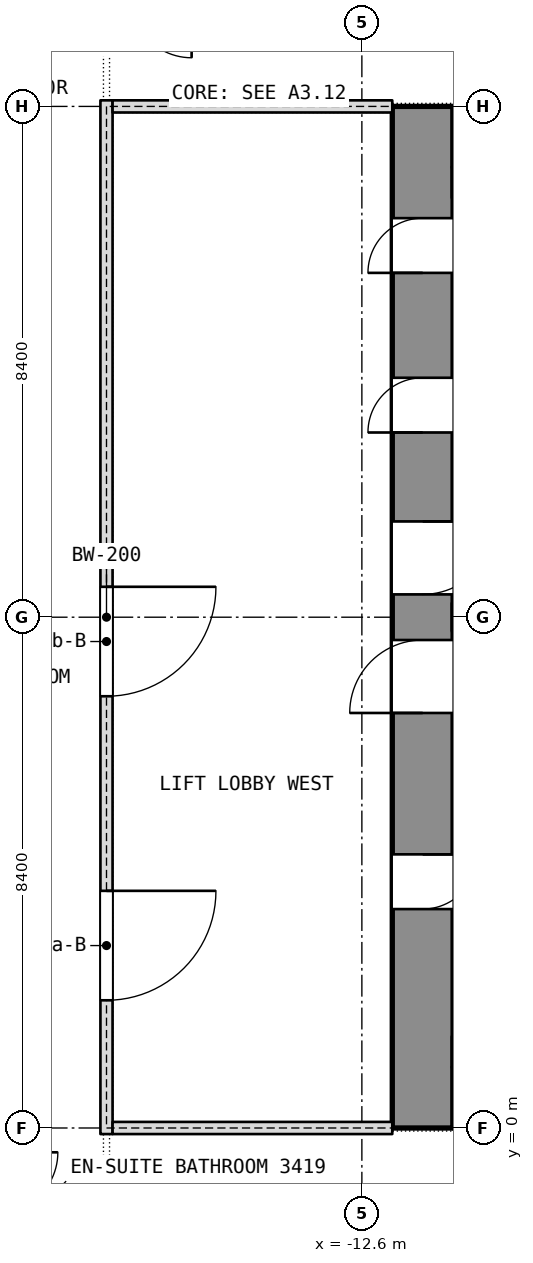
"""IFC4 building model, lengths in metres.
Left out: names, types, materials, properties, quantities, classifications, styles, units other than length and angle.
Written with IfcOpenShell. Run it as: python <this file> out.ifc"""

import sys

from ifc_helpers import new_model, si_unit, direction, frame, frame_2d, origin, place, context, subcontext, project, spatial, rectangle, extrude, element, fill, save


model = new_model("IFC4")
c1 = context("Model", 3, precision=1e-05, world=origin(), true_north=direction((0.0, 1.0)))
c2 = subcontext(c1, "Body", "Model", "MODEL_VIEW")
j1 = project(units=[si_unit("LENGTHUNIT", "METRE"), si_unit("PLANEANGLEUNIT", "RADIAN")], contexts=[c1])
p1 = place(None, origin())
s1 = spatial("IfcSite", under=j1, at=p1, CompositionType="ELEMENT")
p2 = place(p1, origin())
s2 = spatial("IfcBuilding", under=s1, at=p2, CompositionType="ELEMENT")
p3 = place(p2, frame((0.0, 0.0, 148.1)))
s3 = spatial("IfcBuildingStorey", under=s2, at=p3, CompositionType="ELEMENT", Elevation=148.1)
p4 = place(p3, frame((-11.6, 0.0, 0.0), z_axis=(0.0, 0.0, 1.0), x_axis=(0.0, 1.0, 0.0)))
e1 = element("IfcWall", 1, at=p4, inside=s3, PredefinedType="SHEAR", context=c2, shape_type="SweptSolid", body=[
    extrude(rectangle(XDim=16.8, YDim=1.0, at=frame_2d((8.4, 0.0))), origin(), (0.0, 0.0, 1.0), 3.6),
])
p5 = place(p4, frame((3.6, 0.0, 0.0)))
e2 = element("IfcOpeningElement", 2, at=p5, cuts=e1, PredefinedType="OPENING", context=c2, shape_type="SweptSolid", body=[
    extrude(rectangle(XDim=0.9, YDim=2.1, at=frame_2d((0.45, 1.05))), frame((0.0, 0.5, 0.0), z_axis=(0.0, -1.0, 0.0), x_axis=(1.0, 0.0, 0.0)), (0.0, 0.0, 1.0), 1.0),
])
p6 = place(p4, frame((6.825, 0.0, 0.0)))
e3 = element("IfcOpeningElement", 3, at=p6, cuts=e1, PredefinedType="OPENING", context=c2, shape_type="SweptSolid", body=[
    extrude(rectangle(XDim=1.2, YDim=2.1, at=frame_2d((0.6, 1.05))), frame((0.0, 0.5, 0.0), z_axis=(0.0, -1.0, 0.0), x_axis=(1.0, 0.0, 0.0)), (0.0, 0.0, 1.0), 1.0),
])
p7 = place(p4, frame((14.062, 0.0, 0.0)))
e4 = element("IfcOpeningElement", 4, at=p7, cuts=e1, PredefinedType="OPENING", context=c2, shape_type="SweptSolid", body=[
    extrude(rectangle(XDim=0.9, YDim=2.1, at=frame_2d((0.45, 1.05))), frame((0.0, 0.5, 0.0), z_axis=(0.0, -1.0, 0.0), x_axis=(1.0, 0.0, 0.0)), (0.0, 0.0, 1.0), 1.0),
])
p8 = place(p4, frame((11.438, 0.0, 0.0)))
e5 = element("IfcOpeningElement", 5, at=p8, cuts=e1, PredefinedType="OPENING", context=c2, shape_type="SweptSolid", body=[
    extrude(rectangle(XDim=0.9, YDim=2.1, at=frame_2d((0.45, 1.05))), frame((0.0, 0.5, 0.0), z_axis=(0.0, -1.0, 0.0), x_axis=(1.0, 0.0, 0.0)), (0.0, 0.0, 1.0), 1.0),
])
p9 = place(p4, frame((8.775, 0.0, 0.0)))
e6 = element("IfcOpeningElement", 6, at=p9, cuts=e1, PredefinedType="OPENING", context=c2, shape_type="SweptSolid", body=[
    extrude(rectangle(XDim=1.2, YDim=2.1, at=frame_2d((0.6, 1.05))), frame((0.0, 0.5, 0.0), z_axis=(0.0, -1.0, 0.0), x_axis=(1.0, 0.0, 0.0)), (0.0, 0.0, 1.0), 1.0),
])
p10 = place(p3, frame((-11.1, 8.4, 0.0), z_axis=(0.0, 0.0, 1.0), x_axis=(1.0, 0.0, 0.0)))
e7 = element("IfcWall", 7, at=p10, inside=s3, PredefinedType="SHEAR", context=c2, shape_type="SweptSolid", body=[
    extrude(rectangle(XDim=6.675, YDim=0.45, at=frame_2d((3.337, 0.0))), origin(), (0.0, 0.0, 1.0), 3.6),
])
p11 = place(p3, frame((-16.8, -0.1, 0.0), z_axis=(0.0, 0.0, 1.0), x_axis=(0.0, 1.0, 0.0)))
e8 = element("IfcWall", 8, at=p11, inside=s3, PredefinedType="PARTITIONING", context=c2, shape_type="SweptSolid", body=[
    extrude(rectangle(XDim=17.0, YDim=0.2, at=frame_2d((8.5, 0.0))), origin(), (0.0, 0.0, 1.0), 3.34),
])
p12 = place(p11, frame((2.2, 0.0, 0.0)))
e9 = element("IfcOpeningElement", 9, at=p12, cuts=e8, PredefinedType="OPENING", context=c2, shape_type="SweptSolid", body=[
    extrude(rectangle(XDim=1.8, YDim=2.1, at=frame_2d((0.9, 1.05))), frame((0.0, 0.1, 0.0), z_axis=(0.0, -1.0, 0.0), x_axis=(1.0, 0.0, 0.0)), (0.0, 0.0, 1.0), 0.2),
])
p13 = place(p11, frame((7.2, 0.0, 0.0)))
e10 = element("IfcOpeningElement", 10, at=p13, cuts=e8, PredefinedType="OPENING", context=c2, shape_type="SweptSolid", body=[
    extrude(rectangle(XDim=1.8, YDim=2.1, at=frame_2d((0.9, 1.05))), frame((0.0, 0.1, 0.0), z_axis=(0.0, -1.0, 0.0), x_axis=(1.0, 0.0, 0.0)), (0.0, 0.0, 1.0), 0.2),
])
for number, where, z_axis, x_axis in (
    (11, (-16.7, 0.0, 0.0), (0.0, 0.0, 1.0), (1.0, 0.0, 0.0)),
    (12, (-16.7, 16.8, 0.0), (0.0, 0.0, 1.0), (1.0, 0.0, 0.0)),
):
    element("IfcWall", number, at=place(p3, frame(where, z_axis=z_axis, x_axis=x_axis)), inside=s3, PredefinedType="PARTITIONING", context=c2, shape_type="SweptSolid", body=[
        extrude(rectangle(XDim=4.6, YDim=0.2, at=frame_2d((2.3, 0.0))), origin(), (0.0, 0.0, 1.0), 2.89),
    ])
p14 = place(p5, origin())
e13 = element("IfcDoor", 13, at=p14, inside=s3, OperationType="SINGLE_SWING_LEFT", PredefinedType="DOOR", context=c2, shape_type="SweptSolid", body=[
    extrude(rectangle(XDim=0.9, YDim=2.1, at=frame_2d((0.45, 1.05))), frame((0.0, 0.025, 0.0), z_axis=(0.0, -1.0, 0.0), x_axis=(1.0, 0.0, 0.0)), (0.0, 0.0, 1.0), 0.05),
])
fill(e2, e13)
p15 = place(p6, origin())
e14 = element("IfcDoor", 14, at=p15, inside=s3, OperationType="SINGLE_SWING_LEFT", PredefinedType="DOOR", context=c2, shape_type="SweptSolid", body=[
    extrude(rectangle(XDim=1.2, YDim=2.1, at=frame_2d((0.6, 1.05))), frame((0.0, 0.025, 0.0), z_axis=(0.0, -1.0, 0.0), x_axis=(1.0, 0.0, 0.0)), (0.0, 0.0, 1.0), 0.05),
])
fill(e3, e14)
p16 = place(p7, origin())
e15 = element("IfcDoor", 15, at=p16, inside=s3, OperationType="SINGLE_SWING_LEFT", PredefinedType="DOOR", context=c2, shape_type="SweptSolid", body=[
    extrude(rectangle(XDim=0.9, YDim=2.1, at=frame_2d((0.45, 1.05))), frame((0.0, 0.025, 0.0), z_axis=(0.0, -1.0, 0.0), x_axis=(1.0, 0.0, 0.0)), (0.0, 0.0, 1.0), 0.05),
])
fill(e4, e15)
p17 = place(p8, origin())
e16 = element("IfcDoor", 16, at=p17, inside=s3, OperationType="SINGLE_SWING_LEFT", PredefinedType="DOOR", context=c2, shape_type="SweptSolid", body=[
    extrude(rectangle(XDim=0.9, YDim=2.1, at=frame_2d((0.45, 1.05))), frame((0.0, 0.025, 0.0), z_axis=(0.0, -1.0, 0.0), x_axis=(1.0, 0.0, 0.0)), (0.0, 0.0, 1.0), 0.05),
])
fill(e5, e16)
p18 = place(p9, origin())
e17 = element("IfcDoor", 17, at=p18, inside=s3, OperationType="SINGLE_SWING_LEFT", PredefinedType="DOOR", context=c2, shape_type="SweptSolid", body=[
    extrude(rectangle(XDim=1.2, YDim=2.1, at=frame_2d((0.6, 1.05))), frame((0.0, 0.025, 0.0), z_axis=(0.0, -1.0, 0.0), x_axis=(1.0, 0.0, 0.0)), (0.0, 0.0, 1.0), 0.05),
])
fill(e6, e17)
p19 = place(p12, origin())
e18 = element("IfcDoor", 18, at=p19, inside=s3, OperationType="DOUBLE_DOOR_SINGLE_SWING", PredefinedType="DOOR", context=c2, shape_type="SweptSolid", body=[
    extrude(rectangle(XDim=1.8, YDim=2.1, at=frame_2d((0.9, 1.05))), frame((0.0, 0.025, 0.0), z_axis=(0.0, -1.0, 0.0), x_axis=(1.0, 0.0, 0.0)), (0.0, 0.0, 1.0), 0.05),
])
fill(e9, e18)
p20 = place(p13, origin())
e19 = element("IfcDoor", 19, at=p20, inside=s3, OperationType="DOUBLE_DOOR_SINGLE_SWING", PredefinedType="DOOR", context=c2, shape_type="SweptSolid", body=[
    extrude(rectangle(XDim=1.8, YDim=2.1, at=frame_2d((0.9, 1.05))), frame((0.0, 0.025, 0.0), z_axis=(0.0, -1.0, 0.0), x_axis=(1.0, 0.0, 0.0)), (0.0, 0.0, 1.0), 0.05),
])
fill(e10, e19)
save(model, sys.argv[1])
